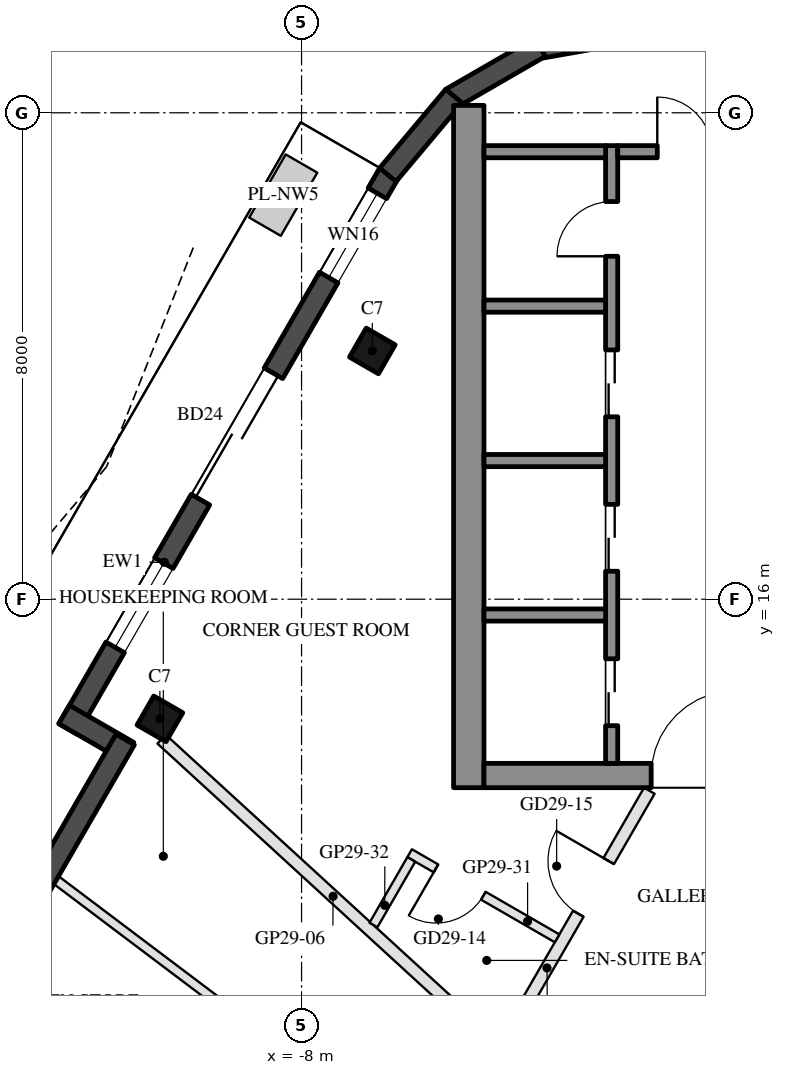
"""IFC4 building model, lengths in metres.
Left out: names, types, materials, properties, quantities, classifications, styles, units other than length and angle.
Written with IfcOpenShell. Run it as: python <this file> out.ifc"""

import sys

from ifc_helpers import new_model, si_unit, direction, frame, frame_2d, origin, origin_2d, place, context, subcontext, project, spatial, rectangle, hollow_rectangle, extrude, boolean, halfspace, element, fill, save


model = new_model("IFC4")
c1 = context("Model", 3, precision=1e-05, world=origin(), true_north=direction((0.0, 1.0)))
c2 = subcontext(c1, "Body", "Model", "MODEL_VIEW")
j1 = project(units=[si_unit("LENGTHUNIT", "METRE"), si_unit("PLANEANGLEUNIT", "RADIAN")], contexts=[c1])
p1 = place(None, origin())
s1 = spatial("IfcSite", under=j1, at=p1, CompositionType="ELEMENT")
p2 = place(p1, origin())
s2 = spatial("IfcBuilding", under=s1, at=p2, CompositionType="ELEMENT")
p3 = place(p2, frame((0.0, 0.0, 294.8)))
s3 = spatial("IfcBuildingStorey", under=s2, at=p3, CompositionType="ELEMENT", Elevation=294.8)
p4 = place(p3, frame((-6.836, 20.083, 0.0), z_axis=(0.0, 0.0, 1.0), x_axis=(0.5, 0.866025403784, 0.0)))
e1 = element("IfcColumn", 1, at=p4, inside=s3, PredefinedType="COLUMN", context=c2, shape_type="SweptSolid", body=[
    boolean("DIFFERENCE", extrude(hollow_rectangle(XDim=0.55, YDim=0.55, WallThickness=0.025, at=origin_2d()), origin(), (0.0, 0.0, 1.0), 3.7), halfspace(frame((0.0, 0.0, 3.66), z_axis=(0.0, 0.0, 1.0), x_axis=(1.0, 0.0, 0.0)), False)),
])
p5 = place(p3, frame((-10.33, 14.032, 0.0), z_axis=(0.0, 0.0, 1.0), x_axis=(0.5, 0.866025403784, 0.0)))
e2 = element("IfcColumn", 2, at=p5, inside=s3, PredefinedType="COLUMN", context=c2, shape_type="SweptSolid", body=[
    boolean("DIFFERENCE", extrude(hollow_rectangle(XDim=0.55, YDim=0.55, WallThickness=0.025, at=origin_2d()), origin(), (0.0, 0.0, 1.0), 3.7), halfspace(frame((0.0, 0.0, 3.666), z_axis=(0.0, 0.0, 1.0), x_axis=(1.0, 0.0, 0.0)), False)),
])
p6 = place(p3, frame((-6.563, 23.005, 0.0), z_axis=(0.0, 0.0, 1.0), x_axis=(-0.500010118922, -0.866019561543, 0.0)))
e3 = element("IfcWall", 3, at=p6, inside=s3, PredefinedType="SOLIDWALL", context=c2, shape_type="SweptSolid", body=[
    extrude(rectangle(XDim=10.554, YDim=0.35, at=frame_2d((5.277, 0.0))), origin(), (0.0, 0.0, 1.0), 3.55),
])
p7 = place(p6, frame((0.38, 0.0, 0.3)))
e4 = element("IfcOpeningElement", 4, at=p7, cuts=e3, PredefinedType="OPENING", context=c2, shape_type="SweptSolid", body=[
    extrude(rectangle(XDim=1.6, YDim=2.65, at=frame_2d((0.8, 1.325))), frame((0.0, 0.185, 0.0), z_axis=(0.0, -1.0, 0.0), x_axis=(1.0, 0.0, 0.0)), (0.0, 0.0, 1.0), 0.37),
])
p8 = place(p6, frame((3.798, 0.0, 0.0)))
e5 = element("IfcOpeningElement", 5, at=p8, cuts=e3, PredefinedType="OPENING", context=c2, shape_type="SweptSolid", body=[
    extrude(rectangle(XDim=2.4, YDim=2.4, at=frame_2d((1.2, 1.2))), frame((0.0, 0.185, 0.0), z_axis=(0.0, -1.0, 0.0), x_axis=(1.0, 0.0, 0.0)), (0.0, 0.0, 1.0), 0.37),
])
p9 = place(p6, frame((7.404, 0.0, 0.3)))
e6 = element("IfcOpeningElement", 6, at=p9, cuts=e3, PredefinedType="OPENING", context=c2, shape_type="SweptSolid", body=[
    extrude(rectangle(XDim=1.6, YDim=2.65, at=frame_2d((0.8, 1.325))), frame((0.0, 0.185, 0.0), z_axis=(0.0, -1.0, 0.0), x_axis=(1.0, 0.0, 0.0)), (0.0, 0.0, 1.0), 0.37),
])
p10 = place(p3, frame((-11.905, 14.104, 0.0), z_axis=(0.0, 0.0, 1.0), x_axis=(0.866005645448, -0.500034220881, 0.0)))
e7 = element("IfcWall", 7, at=p10, inside=s3, PredefinedType="SOLIDWALL", context=c2, shape_type="SweptSolid", body=[
    extrude(rectangle(XDim=1.22, YDim=0.35, at=frame_2d((0.61, 0.0))), origin(), (0.0, 0.0, 1.0), 3.55),
])
p11 = place(p3, frame((-10.901, 13.692, 0.0), z_axis=(0.0, 0.0, 1.0), x_axis=(-0.499987198161, -0.866032794804, 0.0)))
e8 = element("IfcWall", 8, at=p11, inside=s3, PredefinedType="SOLIDWALL", context=c2, shape_type="SweptSolid", body=[
    extrude(rectangle(XDim=5.827, YDim=0.35, at=frame_2d((2.914, 0.0))), origin(), (0.0, 0.0, 1.0), 3.55),
])
for number, where, z_axis, x_axis in (
    (9, (-2.472, 25.353, 0.0), (0.0, 0.0, 1.0), (-0.985, -0.174, 0.0)),
    (10, (-4.078, 25.08, 0.0), (0.0, 0.0, 1.0), (-0.866, -0.5, 0.0)),
    (11, (-5.495, 24.274, 0.0), (0.0, 0.0, 1.0), (-0.643, -0.766, 0.0)),
):
    element("IfcWall", number, at=place(p3, frame(where, z_axis=z_axis, x_axis=x_axis)), inside=s3, PredefinedType="SOLIDWALL", context=c2, shape_type="SweptSolid", body=[
        extrude(rectangle(XDim=1.689, YDim=0.35, at=frame_2d((0.845, 0.0))), origin(), (0.0, 0.0, 1.0), 3.55),
    ])
p12 = place(p3, frame((-5.25, 12.9, 0.0), z_axis=(0.0, 0.0, 1.0), x_axis=(0.0, 1.0, 0.0)))
e12 = element("IfcWall", 12, at=p12, inside=s3, PredefinedType="SHEAR", context=c2, shape_type="SweptSolid", body=[
    extrude(rectangle(XDim=11.222, YDim=0.5, at=frame_2d((5.611, 0.0))), origin(), (0.0, 0.0, 1.0), 3.5),
])
p13 = place(p3, frame((5.0, 13.1, 0.0), z_axis=(0.0, 0.0, 1.0), x_axis=(-1.0, 0.0, 0.0)))
e13 = element("IfcWall", 13, at=p13, inside=s3, PredefinedType="SHEAR", context=c2, shape_type="SweptSolid", body=[
    extrude(rectangle(XDim=10.0, YDim=0.4, at=frame_2d((5.0, 0.0))), origin(), (0.0, 0.0, 1.0), 3.5),
])
p14 = place(p13, frame((3.55, 0.0, 0.0)))
e14 = element("IfcOpeningElement", 14, at=p14, cuts=e13, PredefinedType="OPENING", context=c2, shape_type="SweptSolid", body=[
    extrude(rectangle(XDim=1.1, YDim=2.1, at=frame_2d((0.55, 1.05))), frame((0.0, 0.21, 0.0), z_axis=(0.0, -1.0, 0.0), x_axis=(1.0, 0.0, 0.0)), (0.0, 0.0, 1.0), 0.42),
])
p15 = place(p13, frame((5.85, 0.0, 0.0)))
e15 = element("IfcOpeningElement", 15, at=p15, cuts=e13, PredefinedType="OPENING", context=c2, shape_type="SweptSolid", body=[
    extrude(rectangle(XDim=1.4, YDim=2.1, at=frame_2d((0.7, 1.05))), frame((0.0, 0.21, 0.0), z_axis=(0.0, -1.0, 0.0), x_axis=(1.0, 0.0, 0.0)), (0.0, 0.0, 1.0), 0.42),
])
p16 = place(p3, frame((-2.9, 13.3, 0.0), z_axis=(0.0, 0.0, 1.0), x_axis=(0.0, 1.0, 0.0)))
e16 = element("IfcWall", 16, at=p16, inside=s3, PredefinedType="SHEAR", context=c2, shape_type="SweptSolid", body=[
    extrude(rectangle(XDim=10.16, YDim=0.2, at=frame_2d((5.08, 0.0))), origin(), (0.0, 0.0, 1.0), 3.5),
])
p17 = place(p16, frame((0.62, 0.0, 0.0)))
e17 = element("IfcOpeningElement", 17, at=p17, cuts=e16, PredefinedType="OPENING", context=c2, shape_type="SweptSolid", body=[
    extrude(rectangle(XDim=1.1, YDim=2.1, at=frame_2d((0.55, 1.05))), frame((0.0, 0.11, 0.0), z_axis=(0.0, -1.0, 0.0), x_axis=(1.0, 0.0, 0.0)), (0.0, 0.0, 1.0), 0.22),
])
p18 = place(p16, frame((3.16, 0.0, 0.0)))
e18 = element("IfcOpeningElement", 18, at=p18, cuts=e16, PredefinedType="OPENING", context=c2, shape_type="SweptSolid", body=[
    extrude(rectangle(XDim=1.1, YDim=2.1, at=frame_2d((0.55, 1.05))), frame((0.0, 0.11, 0.0), z_axis=(0.0, -1.0, 0.0), x_axis=(1.0, 0.0, 0.0)), (0.0, 0.0, 1.0), 0.22),
])
p19 = place(p16, frame((5.7, 0.0, 0.0)))
e19 = element("IfcOpeningElement", 19, at=p19, cuts=e16, PredefinedType="OPENING", context=c2, shape_type="SweptSolid", body=[
    extrude(rectangle(XDim=1.1, YDim=2.1, at=frame_2d((0.55, 1.05))), frame((0.0, 0.11, 0.0), z_axis=(0.0, -1.0, 0.0), x_axis=(1.0, 0.0, 0.0)), (0.0, 0.0, 1.0), 0.22),
])
p20 = place(p16, frame((8.34, 0.0, 0.0)))
e20 = element("IfcOpeningElement", 20, at=p20, cuts=e16, PredefinedType="OPENING", context=c2, shape_type="SweptSolid", body=[
    extrude(rectangle(XDim=0.9, YDim=2.1, at=frame_2d((0.45, 1.05))), frame((0.0, 0.11, 0.0), z_axis=(0.0, -1.0, 0.0), x_axis=(1.0, 0.0, 0.0)), (0.0, 0.0, 1.0), 0.22),
])
p21 = place(p3, frame((-1.0, 23.36, 0.0), z_axis=(0.0, 0.0, 1.0), x_axis=(-1.0, 0.0, 0.0)))
e21 = element("IfcWall", 21, at=p21, inside=s3, PredefinedType="SHEAR", context=c2, shape_type="SweptSolid", body=[
    extrude(rectangle(XDim=1.8, YDim=0.2, at=frame_2d((0.9, 0.0))), origin(), (0.0, 0.0, 1.0), 3.5),
])
p22 = place(p21, frame((0.25, 0.0, 0.0)))
e22 = element("IfcOpeningElement", 22, at=p22, cuts=e21, PredefinedType="OPENING", context=c2, shape_type="SweptSolid", body=[
    extrude(rectangle(XDim=0.9, YDim=2.1, at=frame_2d((0.45, 1.05))), frame((0.0, 0.11, 0.0), z_axis=(0.0, -1.0, 0.0), x_axis=(1.0, 0.0, 0.0)), (0.0, 0.0, 1.0), 0.22),
])
for number, where, z_axis, x_axis in (
    (23, (-3.0, 15.74, 0.0), (0.0, 0.0, 1.0), (-1.0, 0.0, 0.0)),
    (24, (-3.0, 18.28, 0.0), (0.0, 0.0, 1.0), (-1.0, 0.0, 0.0)),
    (25, (-3.0, 20.82, 0.0), (0.0, 0.0, 1.0), (-1.0, 0.0, 0.0)),
    (26, (-3.0, 23.36, 0.0), (0.0, 0.0, 1.0), (-1.0, 0.0, 0.0)),
):
    element("IfcWall", number, at=place(p3, frame(where, z_axis=z_axis, x_axis=x_axis)), inside=s3, PredefinedType="SHEAR", context=c2, shape_type="SweptSolid", body=[
        extrude(rectangle(XDim=2.0, YDim=0.2, at=frame_2d((1.0, 0.0))), origin(), (0.0, 0.0, 1.0), 3.5),
    ])
p23 = place(p3, frame((-10.302, 13.698, 0.0), z_axis=(0.0, 0.0, 1.0), x_axis=(0.737268015828, -0.675600379541, 0.0)))
e27 = element("IfcWall", 27, at=p23, inside=s3, PredefinedType="PARTITIONING", context=c2, shape_type="SweptSolid", body=[
    extrude(rectangle(XDim=7.653, YDim=0.2, at=frame_2d((3.826, 0.0))), origin(), (0.0, 0.0, 1.0), 3.1),
])
p24 = place(p3, frame((-4.685, 8.686, 0.0), z_axis=(0.0, 0.0, 1.0), x_axis=(0.500011088314, 0.866019001848, 0.0)))
e28 = element("IfcWall", 28, at=p24, inside=s3, PredefinedType="PARTITIONING", context=c2, shape_type="SweptSolid", body=[
    extrude(rectangle(XDim=4.808, YDim=0.2, at=frame_2d((2.404, 0.0))), origin(), (0.0, 0.0, 1.0), 3.05),
])
p25 = place(p24, frame((2.472, 0.0, 0.0)))
e29 = element("IfcOpeningElement", 29, at=p25, cuts=e28, PredefinedType="OPENING", context=c2, shape_type="SweptSolid", body=[
    extrude(rectangle(XDim=1.0, YDim=2.1, at=frame_2d((0.5, 1.05))), frame((0.0, 0.11, 0.0), z_axis=(0.0, -1.0, 0.0), x_axis=(1.0, 0.0, 0.0)), (0.0, 0.0, 1.0), 0.22),
])
p26 = place(p3, frame((-3.798, 10.423, 0.0), z_axis=(0.0, 0.0, 1.0), x_axis=(-0.866034573852, 0.49998411664, 0.0)))
e30 = element("IfcWall", 30, at=p26, inside=s3, PredefinedType="PARTITIONING", context=c2, shape_type="SweptSolid", body=[
    extrude(rectangle(XDim=2.8, YDim=0.15, at=frame_2d((1.4, 0.0))), origin(), (0.0, 0.0, 1.0), 3.05),
])
p27 = place(p26, frame((1.4, 0.0, 0.0)))
e31 = element("IfcOpeningElement", 31, at=p27, cuts=e30, PredefinedType="OPENING", context=c2, shape_type="SweptSolid", body=[
    extrude(rectangle(XDim=0.9, YDim=2.1, at=frame_2d((0.45, 1.05))), frame((0.0, 0.085, 0.0), z_axis=(0.0, -1.0, 0.0), x_axis=(1.0, 0.0, 0.0)), (0.0, 0.0, 1.0), 0.17),
])
p28 = place(p3, frame((-6.195, 11.72, 0.0), z_axis=(0.0, 0.0, 1.0), x_axis=(-0.500016430238, -0.866015917575, 0.0)))
e32 = element("IfcWall", 32, at=p28, inside=s3, PredefinedType="PARTITIONING", context=c2, shape_type="SweptSolid", body=[
    extrude(rectangle(XDim=1.246, YDim=0.15, at=frame_2d((0.623, 0.0))), origin(), (0.0, 0.0, 1.0), 3.05),
])
p29 = place(p3, frame((-12.034, 11.379, 0.0), z_axis=(0.0, 0.0, 1.0), x_axis=(0.798392848023, -0.602136911528, 0.0)))
e33 = element("IfcWall", 33, at=p29, inside=s3, PredefinedType="PARTITIONING", context=c2, shape_type="SweptSolid", body=[
    extrude(rectangle(XDim=7.871, YDim=0.15, at=frame_2d((3.936, 0.0))), origin(), (0.0, 0.0, 1.0), 3.05),
])
p30 = place(p7, origin())
e34 = element("IfcWindow", 34, at=p30, inside=s3, PartitioningType="SINGLE_PANEL", PredefinedType="WINDOW", context=c2, shape_type="SweptSolid", body=[
    extrude(rectangle(XDim=1.6, YDim=2.65, at=frame_2d((0.8, 1.325))), frame((0.0, 0.03, 0.0), z_axis=(0.0, -1.0, 0.0), x_axis=(1.0, 0.0, 0.0)), (0.0, 0.0, 1.0), 0.06),
])
fill(e4, e34)
p31 = place(p8, frame((2.4, 0.0, 0.0), z_axis=(0.0, 0.0, 1.0), x_axis=(-1.0, 0.0, 0.0)))
e35 = element("IfcDoor", 35, at=p31, inside=s3, OperationType="SLIDING_TO_LEFT", PredefinedType="DOOR", context=c2, shape_type="SweptSolid", body=[
    extrude(rectangle(XDim=2.4, YDim=2.4, at=frame_2d((1.2, 1.2))), frame((0.0, 0.025, 0.0), z_axis=(0.0, -1.0, 0.0), x_axis=(1.0, 0.0, 0.0)), (0.0, 0.0, 1.0), 0.05),
])
fill(e5, e35)
p32 = place(p9, origin())
e36 = element("IfcWindow", 36, at=p32, inside=s3, PartitioningType="SINGLE_PANEL", PredefinedType="WINDOW", context=c2, shape_type="SweptSolid", body=[
    extrude(rectangle(XDim=1.6, YDim=2.65, at=frame_2d((0.8, 1.325))), frame((0.0, 0.03, 0.0), z_axis=(0.0, -1.0, 0.0), x_axis=(1.0, 0.0, 0.0)), (0.0, 0.0, 1.0), 0.06),
])
fill(e6, e36)
p33 = place(p17, origin())
e37 = element("IfcDoor", 37, at=p33, inside=s3, OperationType="DOUBLE_DOOR_SLIDING", PredefinedType="DOOR", context=c2, shape_type="SweptSolid", body=[
    extrude(rectangle(XDim=1.1, YDim=2.1, at=frame_2d((0.55, 1.05))), frame((0.0, 0.025, 0.0), z_axis=(0.0, -1.0, 0.0), x_axis=(1.0, 0.0, 0.0)), (0.0, 0.0, 1.0), 0.05),
])
fill(e17, e37)
p34 = place(p18, origin())
e38 = element("IfcDoor", 38, at=p34, inside=s3, OperationType="DOUBLE_DOOR_SLIDING", PredefinedType="DOOR", context=c2, shape_type="SweptSolid", body=[
    extrude(rectangle(XDim=1.1, YDim=2.1, at=frame_2d((0.55, 1.05))), frame((0.0, 0.025, 0.0), z_axis=(0.0, -1.0, 0.0), x_axis=(1.0, 0.0, 0.0)), (0.0, 0.0, 1.0), 0.05),
])
fill(e18, e38)
p35 = place(p19, origin())
e39 = element("IfcDoor", 39, at=p35, inside=s3, OperationType="DOUBLE_DOOR_SLIDING", PredefinedType="DOOR", context=c2, shape_type="SweptSolid", body=[
    extrude(rectangle(XDim=1.1, YDim=2.1, at=frame_2d((0.55, 1.05))), frame((0.0, 0.025, 0.0), z_axis=(0.0, -1.0, 0.0), x_axis=(1.0, 0.0, 0.0)), (0.0, 0.0, 1.0), 0.05),
])
fill(e19, e39)
p36 = place(p20, origin())
e40 = element("IfcDoor", 40, at=p36, inside=s3, OperationType="SINGLE_SWING_LEFT", PredefinedType="DOOR", context=c2, shape_type="SweptSolid", body=[
    extrude(rectangle(XDim=0.9, YDim=2.1, at=frame_2d((0.45, 1.05))), frame((0.0, 0.025, 0.0), z_axis=(0.0, -1.0, 0.0), x_axis=(1.0, 0.0, 0.0)), (0.0, 0.0, 1.0), 0.05),
])
fill(e20, e40)
p37 = place(p22, frame((0.9, 0.0, 0.0), z_axis=(0.0, 0.0, 1.0), x_axis=(-1.0, 0.0, 0.0)))
e41 = element("IfcDoor", 41, at=p37, inside=s3, OperationType="SINGLE_SWING_LEFT", PredefinedType="DOOR", context=c2, shape_type="SweptSolid", body=[
    extrude(rectangle(XDim=0.9, YDim=2.1, at=frame_2d((0.45, 1.05))), frame((0.0, 0.025, 0.0), z_axis=(0.0, -1.0, 0.0), x_axis=(1.0, 0.0, 0.0)), (0.0, 0.0, 1.0), 0.05),
])
fill(e22, e41)
p38 = place(p15, frame((1.4, 0.0, 0.0), z_axis=(0.0, 0.0, 1.0), x_axis=(-1.0, 0.0, 0.0)))
e42 = element("IfcDoor", 42, at=p38, inside=s3, OperationType="DOUBLE_DOOR_SINGLE_SWING", PredefinedType="DOOR", context=c2, shape_type="SweptSolid", body=[
    extrude(rectangle(XDim=1.4, YDim=2.1, at=frame_2d((0.7, 1.05))), frame((0.0, 0.025, 0.0), z_axis=(0.0, -1.0, 0.0), x_axis=(1.0, 0.0, 0.0)), (0.0, 0.0, 1.0), 0.05),
])
fill(e15, e42)
p39 = place(p27, origin())
e43 = element("IfcDoor", 43, at=p39, inside=s3, OperationType="SINGLE_SWING_RIGHT", PredefinedType="DOOR", context=c2, shape_type="SweptSolid", body=[
    extrude(rectangle(XDim=0.9, YDim=2.1, at=frame_2d((0.45, 1.05))), frame((0.0, 0.025, 0.0), z_axis=(0.0, -1.0, 0.0), x_axis=(1.0, 0.0, 0.0)), (0.0, 0.0, 1.0), 0.05),
])
fill(e31, e43)
p40 = place(p25, origin())
e44 = element("IfcDoor", 44, at=p40, inside=s3, OperationType="SINGLE_SWING_RIGHT", PredefinedType="DOOR", context=c2, shape_type="SweptSolid", body=[
    extrude(rectangle(XDim=1.0, YDim=2.1, at=frame_2d((0.5, 1.05))), frame((0.0, 0.025, 0.0), z_axis=(0.0, -1.0, 0.0), x_axis=(1.0, 0.0, 0.0)), (0.0, 0.0, 1.0), 0.05),
])
fill(e29, e44)
save(model, sys.argv[1])
